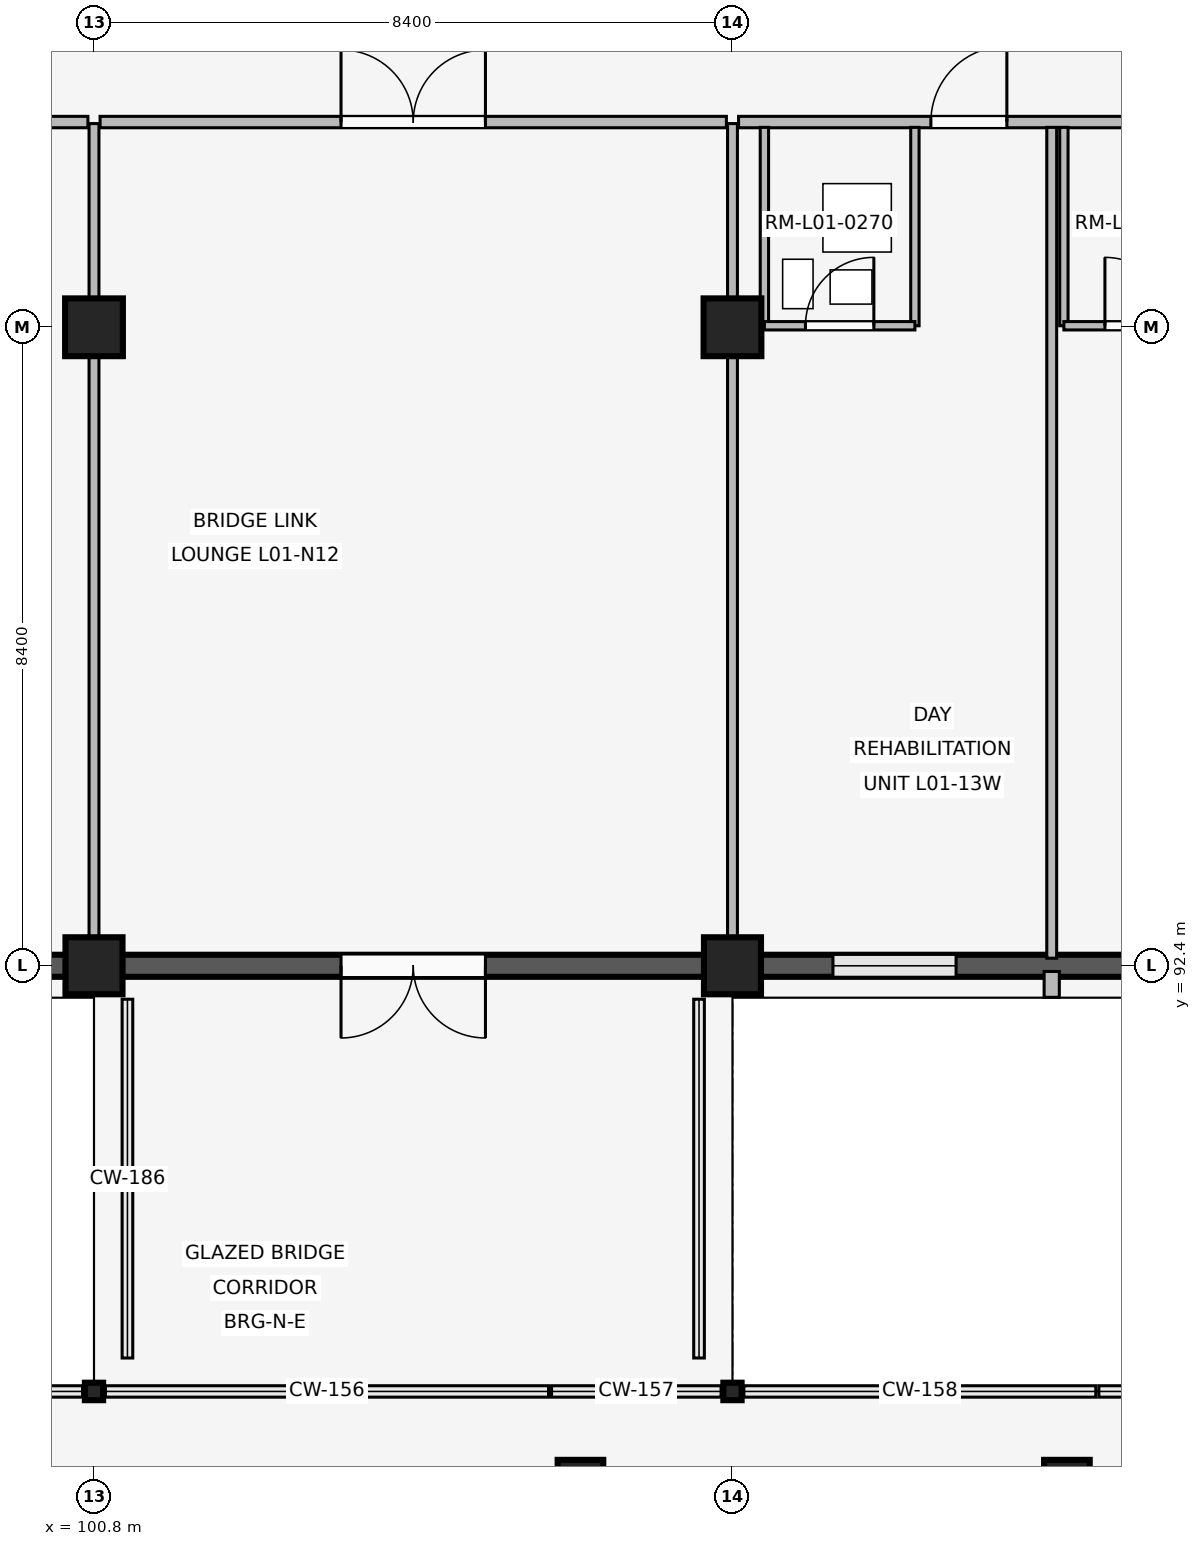
"""IFC4 building model, lengths in metres.
Left out: names, types, materials, properties, quantities, classifications, styles, units other than length and angle.
Written with IfcOpenShell. Run it as: python <this file> out.ifc"""

import sys

from ifc_helpers import new_model, si_unit, direction, frame, frame_2d, origin, origin_2d, place, context, subcontext, project, spatial, rectangle, i_section, extrude, element, fill, save


model = new_model("IFC4")
c1 = context("Model", 3, precision=1e-05, world=origin(), true_north=direction((0.0, 1.0)))
c2 = subcontext(c1, "Body", "Model", "MODEL_VIEW")
j1 = project(units=[si_unit("LENGTHUNIT", "METRE"), si_unit("PLANEANGLEUNIT", "RADIAN")], contexts=[c1])
p1 = place(None, origin())
s1 = spatial("IfcSite", under=j1, at=p1, CompositionType="ELEMENT")
p2 = place(p1, origin())
s2 = spatial("IfcBuilding", under=s1, at=p2, CompositionType="ELEMENT")
p3 = place(p2, frame((0.0, 0.0, 4.8)))
s3 = spatial("IfcBuildingStorey", under=s2, at=p3, CompositionType="ELEMENT", Elevation=4.8)
p4 = place(p3, frame((100.8, 92.4, 0.0), z_axis=(0.0, 0.0, 1.0), x_axis=(1.0, 0.0, 0.0)))
e1 = element("IfcColumn", 1, at=p4, inside=s3, PredefinedType="COLUMN", context=c2, shape_type="SweptSolid", body=[
    extrude(rectangle(XDim=0.75, YDim=0.75, at=origin_2d()), origin(), (0.0, 0.0, 1.0), 3.3),
])
p5 = place(p3, frame((100.8, 100.8, 0.0), z_axis=(0.0, 0.0, 1.0), x_axis=(1.0, 0.0, 0.0)))
e2 = element("IfcColumn", 2, at=p5, inside=s3, PredefinedType="COLUMN", context=c2, shape_type="SweptSolid", body=[
    extrude(rectangle(XDim=0.76, YDim=0.76, at=origin_2d()), origin(), (0.0, 0.0, 1.0), 3.3),
])
p6 = place(p3, frame((109.2, 92.4, 0.0), z_axis=(0.0, 0.0, 1.0), x_axis=(1.0, 0.0, 0.0)))
e3 = element("IfcColumn", 3, at=p6, inside=s3, PredefinedType="COLUMN", context=c2, shape_type="SweptSolid", body=[
    extrude(rectangle(XDim=0.75, YDim=0.75, at=origin_2d()), origin(), (0.0, 0.0, 1.0), 3.3),
])
p7 = place(p3, frame((109.2, 100.8, 0.0), z_axis=(0.0, 0.0, 1.0), x_axis=(1.0, 0.0, 0.0)))
e4 = element("IfcColumn", 4, at=p7, inside=s3, PredefinedType="COLUMN", context=c2, shape_type="SweptSolid", body=[
    extrude(rectangle(XDim=0.76, YDim=0.76, at=origin_2d()), origin(), (0.0, 0.0, 1.0), 3.3),
])
for number, where, z_axis, x_axis in (
    (5, (100.8, 86.8, 0.0), (0.0, 0.0, 1.0), (1.0, 0.0, 0.0)),
    (6, (109.2, 86.8, 0.0), (0.0, 0.0, 1.0), (1.0, 0.0, 0.0)),
):
    element("IfcColumn", number, at=place(p3, frame(where, z_axis=z_axis, x_axis=x_axis)), inside=s3, PredefinedType="COLUMN", context=c2, shape_type="SweptSolid", body=[
        extrude(i_section(OverallWidth=0.24, OverallDepth=0.23, WebThickness=0.008, FlangeThickness=0.012, at=origin_2d()), origin(), (0.0, 0.0, 1.0), 3.3),
    ])
for number, where, z_axis, x_axis in (
    (7, (107.2, 85.6, 0.0), (0.0, 0.0, 1.0), (1.0, 0.0, 0.0)),
    (8, (113.6, 85.6, 0.0), (0.0, 0.0, 1.0), (1.0, 0.0, 0.0)),
):
    element("IfcColumn", number, at=place(p3, frame(where, z_axis=z_axis, x_axis=x_axis)), inside=s3, PredefinedType="COLUMN", context=c2, shape_type="SweptSolid", body=[
        extrude(rectangle(XDim=0.6, YDim=0.6, at=origin_2d()), origin(), (0.0, 0.0, 1.0), 3.3),
    ])
p8 = place(p3, frame((100.43, 92.4, 0.0), z_axis=(0.0, 0.0, 1.0), x_axis=(-1.0, 0.0, 0.0)))
e9 = element("IfcWall", 9, at=p8, inside=s3, PredefinedType="SOLIDWALL", context=c2, shape_type="SweptSolid", body=[
    extrude(rectangle(XDim=7.66, YDim=0.29, at=frame_2d((3.83, 0.0))), origin(), (0.0, 0.0, 1.0), 2.42),
])
p9 = place(p8, frame((0.952, 0.0, 0.85)))
e10 = element("IfcOpeningElement", 10, at=p9, cuts=e9, PredefinedType="OPENING", context=c2, shape_type="SweptSolid", body=[
    extrude(rectangle(XDim=1.62, YDim=0.95, at=frame_2d((0.81, 0.475))), frame((0.0, 0.155, 0.0), z_axis=(0.0, -1.0, 0.0), x_axis=(1.0, 0.0, 0.0)), (0.0, 0.0, 1.0), 0.31),
])
p10 = place(p8, frame((5.088, 0.0, 0.85)))
e11 = element("IfcOpeningElement", 11, at=p10, cuts=e9, PredefinedType="OPENING", context=c2, shape_type="SweptSolid", body=[
    extrude(rectangle(XDim=1.62, YDim=0.95, at=frame_2d((0.81, 0.475))), frame((0.0, 0.155, 0.0), z_axis=(0.0, -1.0, 0.0), x_axis=(1.0, 0.0, 0.0)), (0.0, 0.0, 1.0), 0.31),
])
p11 = place(p3, frame((108.83, 92.4, 0.0), z_axis=(0.0, 0.0, 1.0), x_axis=(-1.0, 0.0, 0.0)))
e12 = element("IfcWall", 12, at=p11, inside=s3, PredefinedType="SOLIDWALL", context=c2, shape_type="SweptSolid", body=[
    extrude(rectangle(XDim=7.66, YDim=0.29, at=frame_2d((3.83, 0.0))), origin(), (0.0, 0.0, 1.0), 2.42),
])
p12 = place(p11, frame((2.88, 0.0, 0.0)))
e13 = element("IfcOpeningElement", 13, at=p12, cuts=e12, PredefinedType="OPENING", context=c2, shape_type="SweptSolid", body=[
    extrude(rectangle(XDim=1.9, YDim=2.3, at=frame_2d((0.95, 1.15))), frame((0.0, 0.155, 0.0), z_axis=(0.0, -1.0, 0.0), x_axis=(1.0, 0.0, 0.0)), (0.0, 0.0, 1.0), 0.31),
])
p13 = place(p3, frame((117.23, 92.4, 0.0), z_axis=(0.0, 0.0, 1.0), x_axis=(-1.0, 0.0, 0.0)))
e14 = element("IfcWall", 14, at=p13, inside=s3, PredefinedType="SOLIDWALL", context=c2, shape_type="SweptSolid", body=[
    extrude(rectangle(XDim=7.66, YDim=0.29, at=frame_2d((3.83, 0.0))), origin(), (0.0, 0.0, 1.0), 2.42),
])
p14 = place(p13, frame((0.952, 0.0, 0.85)))
e15 = element("IfcOpeningElement", 15, at=p14, cuts=e14, PredefinedType="OPENING", context=c2, shape_type="SweptSolid", body=[
    extrude(rectangle(XDim=1.62, YDim=0.95, at=frame_2d((0.81, 0.475))), frame((0.0, 0.155, 0.0), z_axis=(0.0, -1.0, 0.0), x_axis=(1.0, 0.0, 0.0)), (0.0, 0.0, 1.0), 0.31),
])
p15 = place(p13, frame((5.088, 0.0, 0.85)))
e16 = element("IfcOpeningElement", 16, at=p15, cuts=e14, PredefinedType="OPENING", context=c2, shape_type="SweptSolid", body=[
    extrude(rectangle(XDim=1.62, YDim=0.95, at=frame_2d((0.81, 0.475))), frame((0.0, 0.155, 0.0), z_axis=(0.0, -1.0, 0.0), x_axis=(1.0, 0.0, 0.0)), (0.0, 0.0, 1.0), 0.31),
])
p16 = place(p3, frame((113.4, 92.325, 0.0), z_axis=(0.0, 0.0, 1.0), x_axis=(0.0, -1.0, 0.0)))
e17 = element("IfcWall", 17, at=p16, inside=s3, PredefinedType="ELEMENTEDWALL", context=c2, shape_type="SweptSolid", body=[
    extrude(rectangle(XDim=0.34, YDim=0.2, at=frame_2d((0.17, 0.0))), origin(), (0.0, 0.0, 1.0), 2.4),
])
p17 = place(p3, frame((92.76, 103.5, 0.0), z_axis=(0.0, 0.0, 1.0), x_axis=(1.0, 0.0, 0.0)))
e18 = element("IfcWall", 18, at=p17, inside=s3, PredefinedType="PARTITIONING", context=c2, shape_type="SweptSolid", body=[
    extrude(rectangle(XDim=7.96, YDim=0.15, at=frame_2d((3.98, 0.0))), origin(), (0.0, 0.0, 1.0), 2.4),
])
p18 = place(p17, frame((2.25, 0.0, 0.0)))
e19 = element("IfcOpeningElement", 19, at=p18, cuts=e18, PredefinedType="OPENING", context=c2, shape_type="SweptSolid", body=[
    extrude(rectangle(XDim=1.0, YDim=2.15, at=frame_2d((0.5, 1.075))), frame((0.0, 0.085, 0.0), z_axis=(0.0, -1.0, 0.0), x_axis=(1.0, 0.0, 0.0)), (0.0, 0.0, 1.0), 0.17),
])
p19 = place(p17, frame((5.95, 0.0, 0.0)))
e20 = element("IfcOpeningElement", 20, at=p19, cuts=e18, PredefinedType="OPENING", context=c2, shape_type="SweptSolid", body=[
    extrude(rectangle(XDim=1.0, YDim=2.15, at=frame_2d((0.5, 1.075))), frame((0.0, 0.085, 0.0), z_axis=(0.0, -1.0, 0.0), x_axis=(1.0, 0.0, 0.0)), (0.0, 0.0, 1.0), 0.17),
])
p20 = place(p3, frame((100.8, 92.54, 0.0), z_axis=(0.0, 0.0, 1.0), x_axis=(0.0, 1.0, 0.0)))
e21 = element("IfcWall", 21, at=p20, inside=s3, PredefinedType="PARTITIONING", context=c2, shape_type="SweptSolid", body=[
    extrude(rectangle(XDim=10.94, YDim=0.13, at=frame_2d((5.47, 0.0))), origin(), (0.0, 0.0, 1.0), 2.4),
])
p21 = place(p3, frame((100.88, 103.5, 0.0), z_axis=(0.0, 0.0, 1.0), x_axis=(1.0, 0.0, 0.0)))
e22 = element("IfcWall", 22, at=p21, inside=s3, PredefinedType="PARTITIONING", context=c2, shape_type="SweptSolid", body=[
    extrude(rectangle(XDim=8.24, YDim=0.15, at=frame_2d((4.12, 0.0))), origin(), (0.0, 0.0, 1.0), 2.4),
])
p22 = place(p21, frame((3.17, 0.0, 0.0)))
e23 = element("IfcOpeningElement", 23, at=p22, cuts=e22, PredefinedType="OPENING", context=c2, shape_type="SweptSolid", body=[
    extrude(rectangle(XDim=1.9, YDim=2.3, at=frame_2d((0.95, 1.15))), frame((0.0, 0.085, 0.0), z_axis=(0.0, -1.0, 0.0), x_axis=(1.0, 0.0, 0.0)), (0.0, 0.0, 1.0), 0.17),
])
p23 = place(p3, frame((109.2, 92.54, 0.0), z_axis=(0.0, 0.0, 1.0), x_axis=(0.0, 1.0, 0.0)))
e24 = element("IfcWall", 24, at=p23, inside=s3, PredefinedType="PARTITIONING", context=c2, shape_type="SweptSolid", body=[
    extrude(rectangle(XDim=10.94, YDim=0.13, at=frame_2d((5.47, 0.0))), origin(), (0.0, 0.0, 1.0), 2.4),
])
p24 = place(p3, frame((109.28, 103.5, 0.0), z_axis=(0.0, 0.0, 1.0), x_axis=(1.0, 0.0, 0.0)))
e25 = element("IfcWall", 25, at=p24, inside=s3, PredefinedType="PARTITIONING", context=c2, shape_type="SweptSolid", body=[
    extrude(rectangle(XDim=8.24, YDim=0.15, at=frame_2d((4.12, 0.0))), origin(), (0.0, 0.0, 1.0), 2.4),
])
p25 = place(p24, frame((2.53, 0.0, 0.0)))
e26 = element("IfcOpeningElement", 26, at=p25, cuts=e25, PredefinedType="OPENING", context=c2, shape_type="SweptSolid", body=[
    extrude(rectangle(XDim=1.0, YDim=2.15, at=frame_2d((0.5, 1.075))), frame((0.0, 0.085, 0.0), z_axis=(0.0, -1.0, 0.0), x_axis=(1.0, 0.0, 0.0)), (0.0, 0.0, 1.0), 0.17),
])
p26 = place(p24, frame((6.23, 0.0, 0.0)))
e27 = element("IfcOpeningElement", 27, at=p26, cuts=e25, PredefinedType="OPENING", context=c2, shape_type="SweptSolid", body=[
    extrude(rectangle(XDim=1.0, YDim=2.15, at=frame_2d((0.5, 1.075))), frame((0.0, 0.085, 0.0), z_axis=(0.0, -1.0, 0.0), x_axis=(1.0, 0.0, 0.0)), (0.0, 0.0, 1.0), 0.17),
])
p27 = place(p3, frame((113.4, 92.5, 0.0), z_axis=(0.0, 0.0, 1.0), x_axis=(0.0, 1.0, 0.0)))
e28 = element("IfcWall", 28, at=p27, inside=s3, PredefinedType="PARTITIONING", context=c2, shape_type="SweptSolid", body=[
    extrude(rectangle(XDim=10.93, YDim=0.13, at=frame_2d((5.465, 0.0))), origin(), (0.0, 0.0, 1.0), 2.4),
])
for number, where, z_axis, x_axis in (
    (29, (109.62, 100.82, 0.0), (0.0, 0.0, 1.0), (0.0, 1.0, 0.0)),
    (30, (111.6, 100.82, 0.0), (0.0, 0.0, 1.0), (0.0, 1.0, 0.0)),
):
    element("IfcWall", number, at=place(p3, frame(where, z_axis=z_axis, x_axis=x_axis)), inside=s3, PredefinedType="PARTITIONING", context=c2, shape_type="SweptSolid", body=[
        extrude(rectangle(XDim=2.61, YDim=0.11, at=frame_2d((1.305, 0.0))), origin(), (0.0, 0.0, 1.0), 2.4),
    ])
p28 = place(p3, frame((109.62, 100.82, 0.0), z_axis=(0.0, 0.0, 1.0), x_axis=(1.0, 0.0, 0.0)))
e31 = element("IfcWall", 31, at=p28, inside=s3, PredefinedType="PARTITIONING", context=c2, shape_type="SweptSolid", body=[
    extrude(rectangle(XDim=1.98, YDim=0.11, at=frame_2d((0.99, 0.0))), origin(), (0.0, 0.0, 1.0), 2.4),
])
p29 = place(p28, frame((0.54, 0.0, 0.0)))
e32 = element("IfcOpeningElement", 32, at=p29, cuts=e31, PredefinedType="OPENING", context=c2, shape_type="SweptSolid", body=[
    extrude(rectangle(XDim=0.9, YDim=2.1, at=frame_2d((0.45, 1.05))), frame((0.0, 0.065, 0.0), z_axis=(0.0, -1.0, 0.0), x_axis=(1.0, 0.0, 0.0)), (0.0, 0.0, 1.0), 0.13),
])
p30 = place(p3, frame((113.56, 100.82, 0.0), z_axis=(0.0, 0.0, 1.0), x_axis=(0.0, 1.0, 0.0)))
e33 = element("IfcWall", 33, at=p30, inside=s3, PredefinedType="PARTITIONING", context=c2, shape_type="SweptSolid", body=[
    extrude(rectangle(XDim=2.61, YDim=0.11, at=frame_2d((1.305, 0.0))), origin(), (0.0, 0.0, 1.0), 2.4),
])
p31 = place(p3, frame((113.56, 100.82, 0.0), z_axis=(0.0, 0.0, 1.0), x_axis=(1.0, 0.0, 0.0)))
e34 = element("IfcWall", 34, at=p31, inside=s3, PredefinedType="PARTITIONING", context=c2, shape_type="SweptSolid", body=[
    extrude(rectangle(XDim=1.98, YDim=0.11, at=frame_2d((0.99, 0.0))), origin(), (0.0, 0.0, 1.0), 2.4),
])
p32 = place(p31, frame((0.54, 0.0, 0.0)))
e35 = element("IfcOpeningElement", 35, at=p32, cuts=e34, PredefinedType="OPENING", context=c2, shape_type="SweptSolid", body=[
    extrude(rectangle(XDim=0.9, YDim=2.1, at=frame_2d((0.45, 1.05))), frame((0.0, 0.065, 0.0), z_axis=(0.0, -1.0, 0.0), x_axis=(1.0, 0.0, 0.0)), (0.0, 0.0, 1.0), 0.13),
])
p33 = place(p12, origin())
e36 = element("IfcDoor", 36, at=p33, inside=s3, OperationType="DOUBLE_SWING_LEFT", PredefinedType="DOOR", context=c2, shape_type="SweptSolid", body=[
    extrude(rectangle(XDim=1.9, YDim=2.3, at=frame_2d((0.95, 1.15))), frame((0.0, 0.025, 0.0), z_axis=(0.0, -1.0, 0.0), x_axis=(1.0, 0.0, 0.0)), (0.0, 0.0, 1.0), 0.05),
])
fill(e13, e36)
p34 = place(p15, origin())
e37 = element("IfcWindow", 37, at=p34, inside=s3, PartitioningType="SINGLE_PANEL", PredefinedType="WINDOW", context=c2, shape_type="SweptSolid", body=[
    extrude(rectangle(XDim=1.62, YDim=0.95, at=frame_2d((0.81, 0.475))), frame((0.0, 0.03, 0.0), z_axis=(0.0, -1.0, 0.0), x_axis=(1.0, 0.0, 0.0)), (0.0, 0.0, 1.0), 0.06),
])
fill(e16, e37)
p35 = place(p22, origin())
e38 = element("IfcDoor", 38, at=p35, inside=s3, OperationType="DOUBLE_SWING_LEFT", PredefinedType="DOOR", context=c2, shape_type="SweptSolid", body=[
    extrude(rectangle(XDim=1.9, YDim=2.3, at=frame_2d((0.95, 1.15))), frame((0.0, 0.025, 0.0), z_axis=(0.0, -1.0, 0.0), x_axis=(1.0, 0.0, 0.0)), (0.0, 0.0, 1.0), 0.05),
])
fill(e23, e38)
p36 = place(p25, origin())
e39 = element("IfcDoor", 39, at=p36, inside=s3, OperationType="SINGLE_SWING_RIGHT", PredefinedType="DOOR", context=c2, shape_type="SweptSolid", body=[
    extrude(rectangle(XDim=1.0, YDim=2.15, at=frame_2d((0.5, 1.075))), frame((0.0, 0.025, 0.0), z_axis=(0.0, -1.0, 0.0), x_axis=(1.0, 0.0, 0.0)), (0.0, 0.0, 1.0), 0.05),
])
fill(e26, e39)
p37 = place(p29, origin())
e40 = element("IfcDoor", 40, at=p37, inside=s3, OperationType="SINGLE_SWING_RIGHT", PredefinedType="DOOR", context=c2, shape_type="SweptSolid", body=[
    extrude(rectangle(XDim=0.9, YDim=2.1, at=frame_2d((0.45, 1.05))), frame((0.0, 0.025, 0.0), z_axis=(0.0, -1.0, 0.0), x_axis=(1.0, 0.0, 0.0)), (0.0, 0.0, 1.0), 0.05),
])
fill(e32, e40)
p38 = place(p32, origin())
e41 = element("IfcDoor", 41, at=p38, inside=s3, OperationType="SINGLE_SWING_LEFT", PredefinedType="DOOR", context=c2, shape_type="SweptSolid", body=[
    extrude(rectangle(XDim=0.9, YDim=2.1, at=frame_2d((0.45, 1.05))), frame((0.0, 0.025, 0.0), z_axis=(0.0, -1.0, 0.0), x_axis=(1.0, 0.0, 0.0)), (0.0, 0.0, 1.0), 0.05),
])
fill(e35, e41)
save(model, sys.argv[1])
